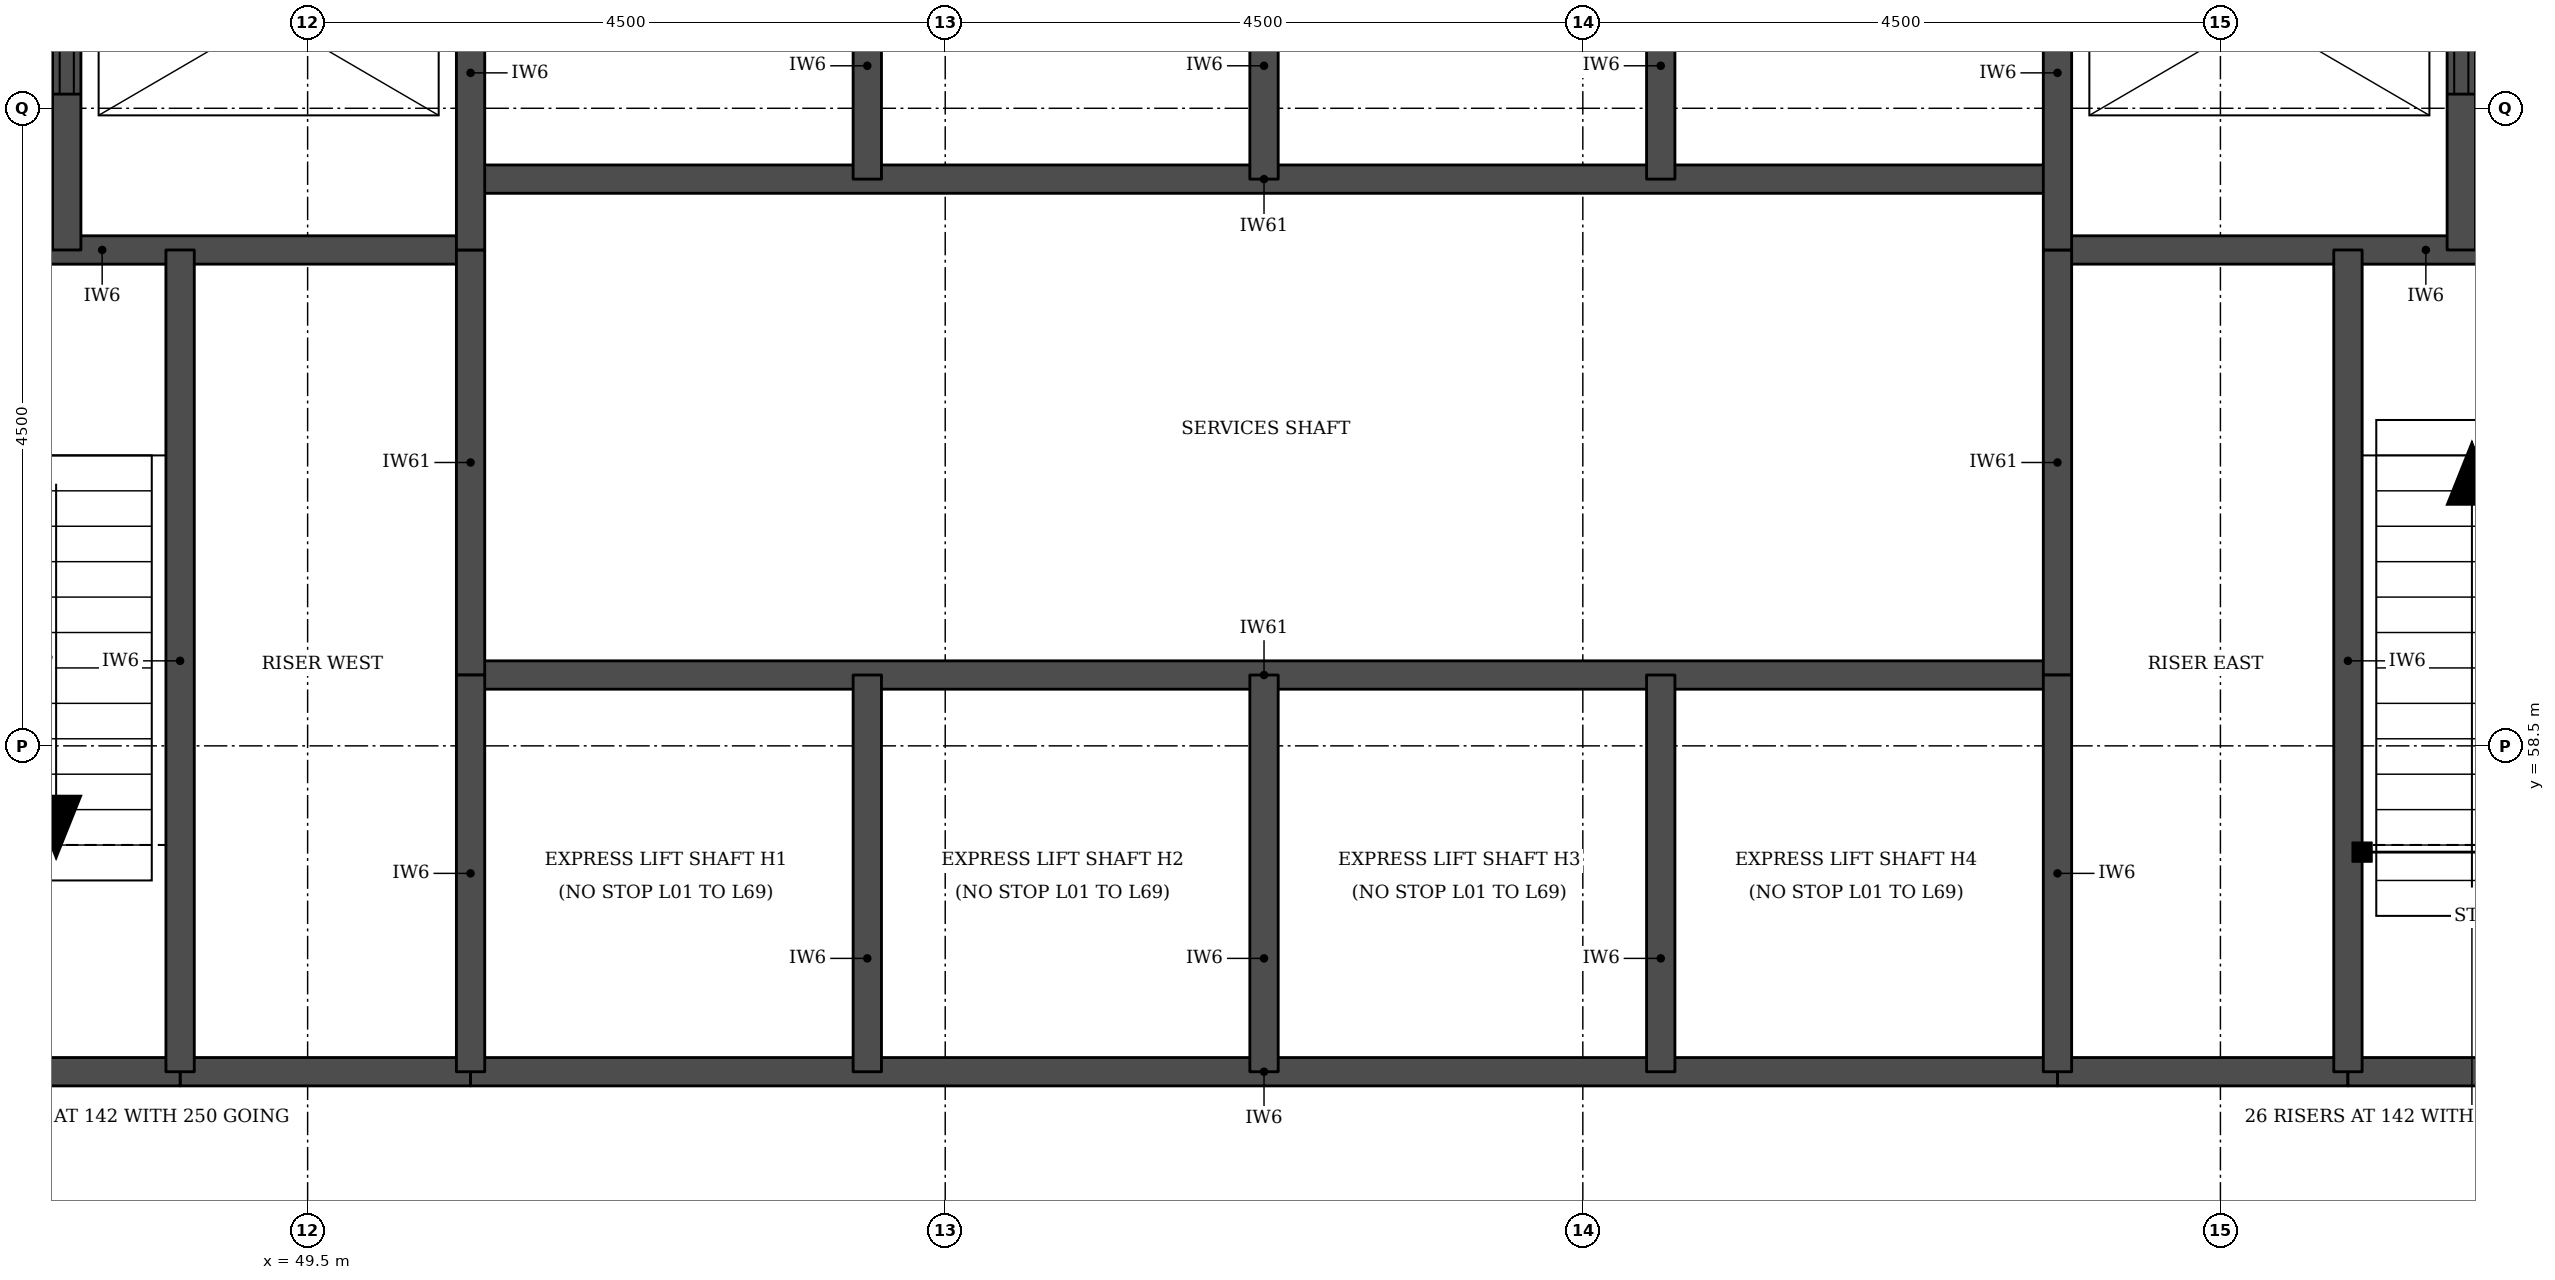
"""IFC4 building model, lengths in metres.
Left out: names, types, materials, properties, quantities, classifications, styles, units other than length and angle.
Written with IfcOpenShell. Run it as: python <this file> out.ifc"""

import sys

from ifc_helpers import new_model, si_unit, direction, frame, frame_2d, origin, place, context, subcontext, project, spatial, rectangle, extrude, element, fill, save


model = new_model("IFC4")
c1 = context("Model", 3, precision=1e-05, world=origin(), true_north=direction((0.0, 1.0)))
c2 = subcontext(c1, "Body", "Model", "MODEL_VIEW")
j1 = project(units=[si_unit("LENGTHUNIT", "METRE"), si_unit("PLANEANGLEUNIT", "RADIAN")], contexts=[c1])
p1 = place(None, origin())
s1 = spatial("IfcSite", under=j1, at=p1, CompositionType="ELEMENT")
p2 = place(p1, origin())
s2 = spatial("IfcBuilding", under=s1, at=p2, CompositionType="ELEMENT")
p3 = place(p2, frame((0.0, 0.0, 112.2)))
s3 = spatial("IfcBuildingStorey", under=s2, at=p3, CompositionType="ELEMENT", Elevation=112.2)
for number, where, z_axis, x_axis in (
    (1, (48.6, 56.2, 0.0), (0.0, 0.0, 1.0), (1.0, 0.0, 0.0)),
    (2, (61.85, 56.2, 0.0), (0.0, 0.0, 1.0), (1.0, 0.0, 0.0)),
):
    element("IfcWall", number, at=place(p3, frame(where, z_axis=z_axis, x_axis=x_axis)), inside=s3, PredefinedType="SOLIDWALL", context=c2, shape_type="SweptSolid", body=[
        extrude(rectangle(XDim=2.05, YDim=0.2, at=frame_2d((1.025, 0.0))), origin(), (0.0, 0.0, 1.0), 3.55),
    ])
p4 = place(p3, frame((45.45, 56.2, 0.0), z_axis=(0.0, 0.0, 1.0), x_axis=(1.0, 0.0, 0.0)))
e3 = element("IfcWall", 3, at=p4, inside=s3, PredefinedType="SOLIDWALL", context=c2, shape_type="SweptSolid", body=[
    extrude(rectangle(XDim=3.15, YDim=0.2, at=frame_2d((1.575, 0.0))), origin(), (0.0, 0.0, 1.0), 3.55),
])
p5 = place(p3, frame((50.65, 56.2, 0.0), z_axis=(0.0, 0.0, 1.0), x_axis=(1.0, 0.0, 0.0)))
e4 = element("IfcWall", 4, at=p5, inside=s3, PredefinedType="SOLIDWALL", context=c2, shape_type="SweptSolid", body=[
    extrude(rectangle(XDim=11.2, YDim=0.2, at=frame_2d((5.6, 0.0))), origin(), (0.0, 0.0, 1.0), 3.55),
])
p6 = place(p3, frame((63.9, 56.2, 0.0), z_axis=(0.0, 0.0, 1.0), x_axis=(1.0, 0.0, 0.0)))
e5 = element("IfcWall", 5, at=p6, inside=s3, PredefinedType="SOLIDWALL", context=c2, shape_type="SweptSolid", body=[
    extrude(rectangle(XDim=3.15, YDim=0.2, at=frame_2d((1.575, 0.0))), origin(), (0.0, 0.0, 1.0), 3.55),
])
p7 = place(p3, frame((50.65, 59.0, 0.0), z_axis=(0.0, 0.0, 1.0), x_axis=(1.0, 0.0, 0.0)))
e6 = element("IfcWall", 6, at=p7, inside=s3, PredefinedType="SOLIDWALL", context=c2, shape_type="SweptSolid", body=[
    extrude(rectangle(XDim=11.2, YDim=0.2, at=frame_2d((5.6, 0.0))), origin(), (0.0, 0.0, 1.0), 3.7),
])
for number, where, z_axis, x_axis in (
    (7, (45.45, 62.0, 0.0), (0.0, 0.0, 1.0), (1.0, 0.0, 0.0)),
    (8, (61.85, 62.0, 0.0), (0.0, 0.0, 1.0), (1.0, 0.0, 0.0)),
):
    element("IfcWall", number, at=place(p3, frame(where, z_axis=z_axis, x_axis=x_axis)), inside=s3, PredefinedType="SOLIDWALL", context=c2, shape_type="SweptSolid", body=[
        extrude(rectangle(XDim=5.2, YDim=0.2, at=frame_2d((2.6, 0.0))), origin(), (0.0, 0.0, 1.0), 3.55),
    ])
p8 = place(p3, frame((50.65, 62.5, 0.0), z_axis=(0.0, 0.0, 1.0), x_axis=(1.0, 0.0, 0.0)))
e9 = element("IfcWall", 9, at=p8, inside=s3, PredefinedType="SOLIDWALL", context=c2, shape_type="SweptSolid", body=[
    extrude(rectangle(XDim=11.2, YDim=0.2, at=frame_2d((5.6, 0.0))), origin(), (0.0, 0.0, 1.0), 3.7),
])
p9 = place(p3, frame((47.8, 62.0, 0.0), z_axis=(0.0, 0.0, 1.0), x_axis=(0.0, 1.0, 0.0)))
e10 = element("IfcWall", 10, at=p9, inside=s3, PredefinedType="SOLIDWALL", context=c2, shape_type="SweptSolid", body=[
    extrude(rectangle(XDim=3.3, YDim=0.2, at=frame_2d((1.65, 0.0))), origin(), (0.0, 0.0, 1.0), 3.55),
])
p10 = place(p9, frame((1.1, 0.0, 0.0)))
e11 = element("IfcOpeningElement", 11, at=p10, cuts=e10, PredefinedType="OPENING", context=c2, shape_type="SweptSolid", body=[
    extrude(rectangle(XDim=1.1, YDim=2.1, at=frame_2d((0.55, 1.05))), frame((0.0, 0.11, 0.0), z_axis=(0.0, -1.0, 0.0), x_axis=(1.0, 0.0, 0.0)), (0.0, 0.0, 1.0), 0.22),
])
p11 = place(p3, frame((48.6, 56.2, 0.0), z_axis=(0.0, 0.0, 1.0), x_axis=(0.0, 1.0, 0.0)))
e12 = element("IfcWall", 12, at=p11, inside=s3, PredefinedType="SOLIDWALL", context=c2, shape_type="SweptSolid", body=[
    extrude(rectangle(XDim=5.8, YDim=0.2, at=frame_2d((2.9, 0.0))), origin(), (0.0, 0.0, 1.0), 3.55),
])
p12 = place(p3, frame((50.65, 59.0, 0.0), z_axis=(0.0, 0.0, 1.0), x_axis=(0.0, 1.0, 0.0)))
e13 = element("IfcWall", 13, at=p12, inside=s3, PredefinedType="SOLIDWALL", context=c2, shape_type="SweptSolid", body=[
    extrude(rectangle(XDim=3.0, YDim=0.2, at=frame_2d((1.5, 0.0))), origin(), (0.0, 0.0, 1.0), 3.7),
])
p13 = place(p3, frame((50.65, 56.2, 0.0), z_axis=(0.0, 0.0, 1.0), x_axis=(0.0, 1.0, 0.0)))
e14 = element("IfcWall", 14, at=p13, inside=s3, PredefinedType="SOLIDWALL", context=c2, shape_type="SweptSolid", body=[
    extrude(rectangle(XDim=2.8, YDim=0.2, at=frame_2d((1.4, 0.0))), origin(), (0.0, 0.0, 1.0), 3.55),
])
p14 = place(p3, frame((50.65, 62.0, 0.0), z_axis=(0.0, 0.0, 1.0), x_axis=(0.0, 1.0, 0.0)))
e15 = element("IfcWall", 15, at=p14, inside=s3, PredefinedType="SOLIDWALL", context=c2, shape_type="SweptSolid", body=[
    extrude(rectangle(XDim=3.3, YDim=0.2, at=frame_2d((1.65, 0.0))), origin(), (0.0, 0.0, 1.0), 3.55),
])
for number, where, z_axis, x_axis in (
    (16, (53.45, 56.2, 0.0), (0.0, 0.0, 1.0), (0.0, 1.0, 0.0)),
    (17, (53.45, 62.5, 0.0), (0.0, 0.0, 1.0), (0.0, 1.0, 0.0)),
    (18, (56.25, 56.2, 0.0), (0.0, 0.0, 1.0), (0.0, 1.0, 0.0)),
    (19, (56.25, 62.5, 0.0), (0.0, 0.0, 1.0), (0.0, 1.0, 0.0)),
    (20, (59.05, 56.2, 0.0), (0.0, 0.0, 1.0), (0.0, 1.0, 0.0)),
    (21, (59.05, 62.5, 0.0), (0.0, 0.0, 1.0), (0.0, 1.0, 0.0)),
):
    element("IfcWall", number, at=place(p3, frame(where, z_axis=z_axis, x_axis=x_axis)), inside=s3, PredefinedType="SOLIDWALL", context=c2, shape_type="SweptSolid", body=[
        extrude(rectangle(XDim=2.8, YDim=0.2, at=frame_2d((1.4, 0.0))), origin(), (0.0, 0.0, 1.0), 3.55),
    ])
p15 = place(p3, frame((61.85, 59.0, 0.0), z_axis=(0.0, 0.0, 1.0), x_axis=(0.0, 1.0, 0.0)))
e22 = element("IfcWall", 22, at=p15, inside=s3, PredefinedType="SOLIDWALL", context=c2, shape_type="SweptSolid", body=[
    extrude(rectangle(XDim=3.0, YDim=0.2, at=frame_2d((1.5, 0.0))), origin(), (0.0, 0.0, 1.0), 3.7),
])
p16 = place(p3, frame((61.85, 56.2, 0.0), z_axis=(0.0, 0.0, 1.0), x_axis=(0.0, 1.0, 0.0)))
e23 = element("IfcWall", 23, at=p16, inside=s3, PredefinedType="SOLIDWALL", context=c2, shape_type="SweptSolid", body=[
    extrude(rectangle(XDim=2.8, YDim=0.2, at=frame_2d((1.4, 0.0))), origin(), (0.0, 0.0, 1.0), 3.55),
])
p17 = place(p3, frame((61.85, 62.0, 0.0), z_axis=(0.0, 0.0, 1.0), x_axis=(0.0, 1.0, 0.0)))
e24 = element("IfcWall", 24, at=p17, inside=s3, PredefinedType="SOLIDWALL", context=c2, shape_type="SweptSolid", body=[
    extrude(rectangle(XDim=3.3, YDim=0.2, at=frame_2d((1.65, 0.0))), origin(), (0.0, 0.0, 1.0), 3.55),
])
p18 = place(p3, frame((63.9, 56.2, 0.0), z_axis=(0.0, 0.0, 1.0), x_axis=(0.0, 1.0, 0.0)))
e25 = element("IfcWall", 25, at=p18, inside=s3, PredefinedType="SOLIDWALL", context=c2, shape_type="SweptSolid", body=[
    extrude(rectangle(XDim=5.8, YDim=0.2, at=frame_2d((2.9, 0.0))), origin(), (0.0, 0.0, 1.0), 3.55),
])
p19 = place(p3, frame((64.7, 62.0, 0.0), z_axis=(0.0, 0.0, 1.0), x_axis=(0.0, 1.0, 0.0)))
e26 = element("IfcWall", 26, at=p19, inside=s3, PredefinedType="SOLIDWALL", context=c2, shape_type="SweptSolid", body=[
    extrude(rectangle(XDim=3.3, YDim=0.2, at=frame_2d((1.65, 0.0))), origin(), (0.0, 0.0, 1.0), 3.55),
])
p20 = place(p19, frame((1.1, 0.0, 0.0)))
e27 = element("IfcOpeningElement", 27, at=p20, cuts=e26, PredefinedType="OPENING", context=c2, shape_type="SweptSolid", body=[
    extrude(rectangle(XDim=1.1, YDim=2.1, at=frame_2d((0.55, 1.05))), frame((0.0, 0.11, 0.0), z_axis=(0.0, -1.0, 0.0), x_axis=(1.0, 0.0, 0.0)), (0.0, 0.0, 1.0), 0.22),
])
p21 = place(p10, origin())
e28 = element("IfcDoor", 28, at=p21, inside=s3, OperationType="DOUBLE_DOOR_SLIDING", PredefinedType="DOOR", context=c2, shape_type="SweptSolid", body=[
    extrude(rectangle(XDim=1.1, YDim=2.1, at=frame_2d((0.55, 1.05))), frame((0.0, 0.025, 0.0), z_axis=(0.0, -1.0, 0.0), x_axis=(1.0, 0.0, 0.0)), (0.0, 0.0, 1.0), 0.05),
])
fill(e11, e28)
p22 = place(p20, origin())
e29 = element("IfcDoor", 29, at=p22, inside=s3, OperationType="DOUBLE_DOOR_SLIDING", PredefinedType="DOOR", context=c2, shape_type="SweptSolid", body=[
    extrude(rectangle(XDim=1.1, YDim=2.1, at=frame_2d((0.55, 1.05))), frame((0.0, 0.025, 0.0), z_axis=(0.0, -1.0, 0.0), x_axis=(1.0, 0.0, 0.0)), (0.0, 0.0, 1.0), 0.05),
])
fill(e27, e29)
save(model, sys.argv[1])
